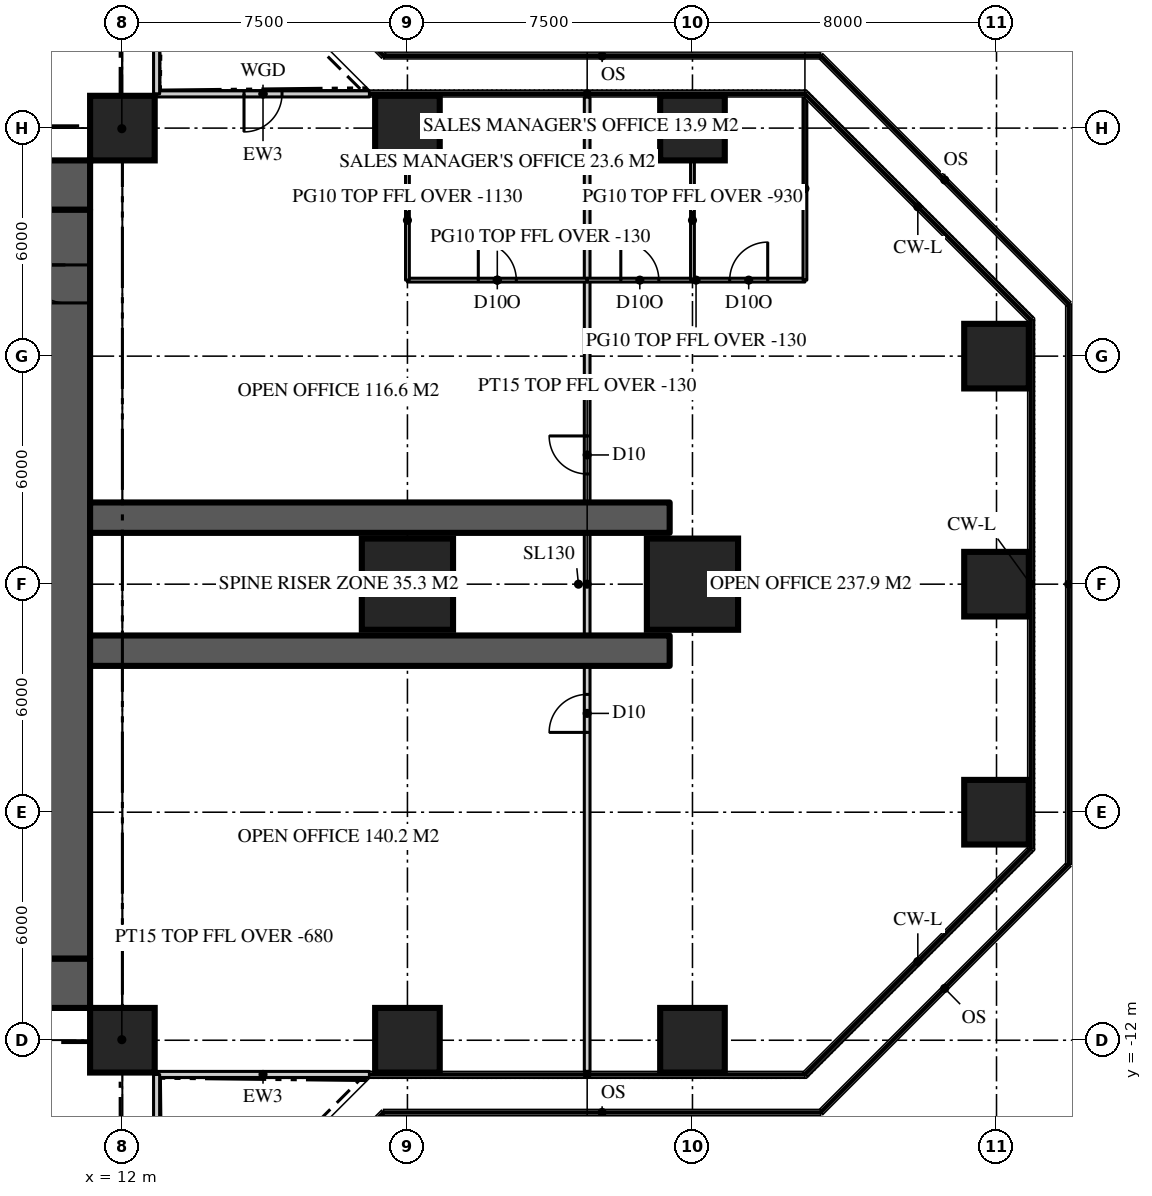
"""IFC4 building model, lengths in metres.
Left out: names, types, materials, properties, quantities, classifications, styles, units other than length and angle.
Written with IfcOpenShell. Run it as: python <this file> out.ifc"""

import sys

from ifc_helpers import new_model, si_unit, direction, frame, frame_2d, origin, origin_2d, place, context, subcontext, project, spatial, rectangle, extrude, element, fill, save


model = new_model("IFC4")
c1 = context("Model", 3, precision=1e-05, world=origin(), true_north=direction((0.0, 1.0)))
c2 = subcontext(c1, "Body", "Model", "MODEL_VIEW")
j1 = project(units=[si_unit("LENGTHUNIT", "METRE"), si_unit("PLANEANGLEUNIT", "RADIAN")], contexts=[c1])
p1 = place(None, origin())
s1 = spatial("IfcSite", under=j1, at=p1, CompositionType="ELEMENT")
p2 = place(p1, origin())
s2 = spatial("IfcBuilding", under=s1, at=p2, CompositionType="ELEMENT")
p3 = place(p2, frame((0.0, 0.0, 90.3)))
s3 = spatial("IfcBuildingStorey", under=s2, at=p3, CompositionType="ELEMENT", Elevation=90.3)
p4 = place(p3, frame((-11.15, 10.5, 0.0), z_axis=(0.0, 0.0, 1.0), x_axis=(1.0, 0.0, 0.0)))
e1 = element("IfcWall", 1, at=p4, inside=s3, PredefinedType="SHEAR", context=c2, shape_type="SweptSolid", body=[
    extrude(rectangle(XDim=22.3, YDim=1.3, at=frame_2d((11.15, 0.0))), origin(), (0.0, 0.0, 1.0), 3.9),
])
p5 = place(p4, frame((4.25, 0.0, 0.0)))
e2 = element("IfcOpeningElement", 2, at=p5, cuts=e1, PredefinedType="OPENING", context=c2, shape_type="SweptSolid", body=[
    extrude(rectangle(XDim=1.8, YDim=2.2, at=frame_2d((0.9, 1.1))), frame((0.0, 0.66, 0.0), z_axis=(0.0, -1.0, 0.0), x_axis=(1.0, 0.0, 0.0)), (0.0, 0.0, 1.0), 1.32),
])
p6 = place(p4, frame((16.25, 0.0, 0.0)))
e3 = element("IfcOpeningElement", 3, at=p6, cuts=e1, PredefinedType="OPENING", context=c2, shape_type="SweptSolid", body=[
    extrude(rectangle(XDim=1.8, YDim=2.2, at=frame_2d((0.9, 1.1))), frame((0.0, 0.66, 0.0), z_axis=(0.0, -1.0, 0.0), x_axis=(1.0, 0.0, 0.0)), (0.0, 0.0, 1.0), 1.32),
])
p7 = place(p3, frame((11.15, -10.5, 0.0), z_axis=(0.0, 0.0, 1.0), x_axis=(-1.0, 0.0, 0.0)))
e4 = element("IfcWall", 4, at=p7, inside=s3, PredefinedType="SHEAR", context=c2, shape_type="SweptSolid", body=[
    extrude(rectangle(XDim=22.3, YDim=1.3, at=frame_2d((11.15, 0.0))), origin(), (0.0, 0.0, 1.0), 3.9),
])
p8 = place(p7, frame((16.25, 0.0, 0.0)))
e5 = element("IfcOpeningElement", 5, at=p8, cuts=e4, PredefinedType="OPENING", context=c2, shape_type="SweptSolid", body=[
    extrude(rectangle(XDim=1.8, YDim=2.2, at=frame_2d((0.9, 1.1))), frame((0.0, 0.66, 0.0), z_axis=(0.0, -1.0, 0.0), x_axis=(1.0, 0.0, 0.0)), (0.0, 0.0, 1.0), 1.32),
])
p9 = place(p7, frame((4.25, 0.0, 0.0)))
e6 = element("IfcOpeningElement", 6, at=p9, cuts=e4, PredefinedType="OPENING", context=c2, shape_type="SweptSolid", body=[
    extrude(rectangle(XDim=1.8, YDim=2.2, at=frame_2d((0.9, 1.1))), frame((0.0, 0.66, 0.0), z_axis=(0.0, -1.0, 0.0), x_axis=(1.0, 0.0, 0.0)), (0.0, 0.0, 1.0), 1.32),
])
p10 = place(p3, frame((10.5, -9.85, 0.0), z_axis=(0.0, 0.0, 1.0), x_axis=(0.0, 1.0, 0.0)))
e7 = element("IfcWall", 7, at=p10, inside=s3, PredefinedType="SHEAR", context=c2, shape_type="SweptSolid", body=[
    extrude(rectangle(XDim=19.7, YDim=1.3, at=frame_2d((9.85, 0.0))), origin(), (0.0, 0.0, 1.0), 3.9),
])
p11 = place(p10, frame((17.25, 0.0, 0.0)))
e8 = element("IfcOpeningElement", 8, at=p11, cuts=e7, PredefinedType="OPENING", context=c2, shape_type="SweptSolid", body=[
    extrude(rectangle(XDim=1.0, YDim=2.2, at=frame_2d((0.5, 1.1))), frame((0.0, 0.66, 0.0), z_axis=(0.0, -1.0, 0.0), x_axis=(1.0, 0.0, 0.0)), (0.0, 0.0, 1.0), 1.32),
])
for number, where, z_axis, x_axis in (
    (9, (11.15, -1.75, 0.0), (0.0, 0.0, 1.0), (1.0, 0.0, 0.0)),
    (10, (11.15, 1.75, 0.0), (0.0, 0.0, 1.0), (1.0, 0.0, 0.0)),
):
    element("IfcWall", number, at=place(p3, frame(where, z_axis=z_axis, x_axis=x_axis)), inside=s3, PredefinedType="SHEAR", context=c2, shape_type="SweptSolid", body=[
        extrude(rectangle(XDim=15.25, YDim=0.8, at=frame_2d((7.625, 0.0))), origin(), (0.0, 0.0, 1.0), 3.9),
    ])
for number, where, z_axis, x_axis in (
    (11, (12.0, -12.0, 0.0), (0.0, 0.0, 1.0), (1.0, 0.0, 0.0)),
    (12, (19.5, -12.0, 0.0), (0.0, 0.0, 1.0), (1.0, 0.0, 0.0)),
    (13, (27.0, -12.0, 0.0), (0.0, 0.0, 1.0), (1.0, 0.0, 0.0)),
    (14, (35.0, -6.0, 0.0), (0.0, 0.0, 1.0), (1.0, 0.0, 0.0)),
):
    element("IfcColumn", number, at=place(p3, frame(where, z_axis=z_axis, x_axis=x_axis)), inside=s3, PredefinedType="COLUMN", context=c2, shape_type="SweptSolid", body=[
        extrude(rectangle(XDim=1.7, YDim=1.7, at=origin_2d()), origin(), (0.0, 0.0, 1.0), 3.9),
    ])
for number, where, z_axis, x_axis in (
    (15, (19.5, 0.0, 0.0), (0.0, 0.0, 1.0), (1.0, 0.0, 0.0)),
    (16, (27.0, 0.0, 0.0), (0.0, 0.0, 1.0), (1.0, 0.0, 0.0)),
):
    element("IfcColumn", number, at=place(p3, frame(where, z_axis=z_axis, x_axis=x_axis)), inside=s3, PredefinedType="COLUMN", context=c2, shape_type="SweptSolid", body=[
        extrude(rectangle(XDim=2.4, YDim=2.4, at=origin_2d()), origin(), (0.0, 0.0, 1.0), 3.9),
    ])
for number, where, z_axis, x_axis in (
    (17, (35.0, 0.0, 0.0), (0.0, 0.0, 1.0), (1.0, 0.0, 0.0)),
    (18, (35.0, 6.0, 0.0), (0.0, 0.0, 1.0), (1.0, 0.0, 0.0)),
    (19, (12.0, 12.0, 0.0), (0.0, 0.0, 1.0), (1.0, 0.0, 0.0)),
    (20, (19.5, 12.0, 0.0), (0.0, 0.0, 1.0), (1.0, 0.0, 0.0)),
    (21, (27.0, 12.0, 0.0), (0.0, 0.0, 1.0), (1.0, 0.0, 0.0)),
):
    element("IfcColumn", number, at=place(p3, frame(where, z_axis=z_axis, x_axis=x_axis)), inside=s3, PredefinedType="COLUMN", context=c2, shape_type="SweptSolid", body=[
        extrude(rectangle(XDim=1.7, YDim=1.7, at=origin_2d()), origin(), (0.0, 0.0, 1.0), 3.9),
    ])
p12 = place(p3, frame((12.9, -12.9, 0.0), z_axis=(0.0, 0.0, 1.0), x_axis=(1.0, 0.0, 0.0)))
e22 = element("IfcWall", 22, at=p12, inside=s3, PredefinedType="SOLIDWALL", context=c2, shape_type="SweptSolid", body=[
    extrude(rectangle(XDim=5.6, YDim=0.16, at=frame_2d((2.8, 0.0))), origin(), (0.0, 0.0, 1.0), 3.77),
])
p13 = place(p3, frame((18.5, 12.9, 0.0), z_axis=(0.0, 0.0, 1.0), x_axis=(-1.0, 0.0, 0.0)))
e23 = element("IfcWall", 23, at=p13, inside=s3, PredefinedType="SOLIDWALL", context=c2, shape_type="SweptSolid", body=[
    extrude(rectangle(XDim=5.6, YDim=0.16, at=frame_2d((2.8, 0.0))), origin(), (0.0, 0.0, 1.0), 3.77),
])
p14 = place(p13, frame((2.3, 0.0, 0.0)))
e24 = element("IfcOpeningElement", 24, at=p14, cuts=e23, PredefinedType="OPENING", context=c2, shape_type="SweptSolid", body=[
    extrude(rectangle(XDim=1.0, YDim=2.2, at=frame_2d((0.5, 1.1))), frame((0.0, 0.09, 0.0), z_axis=(0.0, -1.0, 0.0), x_axis=(1.0, 0.0, 0.0)), (0.0, 0.0, 1.0), 0.18),
])
p15 = place(p3, frame((12.9, 12.9, 0.0), z_axis=(0.0, 0.0, 1.0), x_axis=(0.0, 1.0, 0.0)))
e25 = element("IfcWall", 25, at=p15, inside=s3, PredefinedType="SOLIDWALL", context=c2, shape_type="SweptSolid", body=[
    extrude(rectangle(XDim=5.6, YDim=0.16, at=frame_2d((2.8, 0.0))), origin(), (0.0, 0.0, 1.0), 3.77),
])
p16 = place(p3, frame((12.9, -18.5, 0.0), z_axis=(0.0, 0.0, 1.0), x_axis=(0.0, 1.0, 0.0)))
e26 = element("IfcWall", 26, at=p16, inside=s3, PredefinedType="SOLIDWALL", context=c2, shape_type="SweptSolid", body=[
    extrude(rectangle(XDim=5.6, YDim=0.16, at=frame_2d((2.8, 0.0))), origin(), (0.0, 0.0, 1.0), 3.77),
])
p17 = place(p16, frame((2.3, 0.0, 0.0)))
e27 = element("IfcOpeningElement", 27, at=p17, cuts=e26, PredefinedType="OPENING", context=c2, shape_type="SweptSolid", body=[
    extrude(rectangle(XDim=1.0, YDim=2.2, at=frame_2d((0.5, 1.1))), frame((0.0, 0.09, 0.0), z_axis=(0.0, -1.0, 0.0), x_axis=(1.0, 0.0, 0.0)), (0.0, 0.0, 1.0), 0.18),
])
p18 = place(p3, frame((24.229, -12.82, 0.0), z_axis=(0.0, 0.0, 1.0), x_axis=(0.0, 1.0, 0.0)))
e28 = element("IfcWall", 28, at=p18, inside=s3, PredefinedType="PARTITIONING", context=c2, shape_type="SweptSolid", body=[
    extrude(rectangle(XDim=25.64, YDim=0.15, at=frame_2d((12.82, 0.0))), origin(), (0.0, 0.0, 1.0), 3.77),
])
p19 = place(p18, frame((15.72, 0.0, 0.0)))
e29 = element("IfcOpeningElement", 29, at=p19, cuts=e28, PredefinedType="OPENING", context=c2, shape_type="SweptSolid", body=[
    extrude(rectangle(XDim=1.0, YDim=2.2, at=frame_2d((0.5, 1.1))), frame((0.0, 0.085, 0.0), z_axis=(0.0, -1.0, 0.0), x_axis=(1.0, 0.0, 0.0)), (0.0, 0.0, 1.0), 0.17),
])
p20 = place(p18, frame((8.92, 0.0, 0.0)))
e30 = element("IfcOpeningElement", 30, at=p20, cuts=e28, PredefinedType="OPENING", context=c2, shape_type="SweptSolid", body=[
    extrude(rectangle(XDim=1.0, YDim=2.2, at=frame_2d((0.5, 1.1))), frame((0.0, 0.085, 0.0), z_axis=(0.0, -1.0, 0.0), x_axis=(1.0, 0.0, 0.0)), (0.0, 0.0, 1.0), 0.17),
])
p21 = place(p3, frame((19.5, 8.0, 0.0), z_axis=(0.0, 0.0, 1.0), x_axis=(1.0, 0.0, 0.0)))
e31 = element("IfcWall", 31, at=p21, inside=s3, PredefinedType="PARTITIONING", context=c2, shape_type="SweptSolid", body=[
    extrude(rectangle(XDim=4.729, YDim=0.1, at=frame_2d((2.365, 0.0))), origin(), (0.0, 0.0, 1.0), 3.77),
])
p22 = place(p21, frame((1.865, 0.0, 0.0)))
e32 = element("IfcOpeningElement", 32, at=p22, cuts=e31, PredefinedType="OPENING", context=c2, shape_type="SweptSolid", body=[
    extrude(rectangle(XDim=1.0, YDim=2.2, at=frame_2d((0.5, 1.1))), frame((0.0, 0.06, 0.0), z_axis=(0.0, -1.0, 0.0), x_axis=(1.0, 0.0, 0.0)), (0.0, 0.0, 1.0), 0.12),
])
p23 = place(p3, frame((24.229, 8.0, 0.0), z_axis=(0.0, 0.0, 1.0), x_axis=(1.0, 0.0, 0.0)))
e33 = element("IfcWall", 33, at=p23, inside=s3, PredefinedType="PARTITIONING", context=c2, shape_type="SweptSolid", body=[
    extrude(rectangle(XDim=5.73, YDim=0.1, at=frame_2d((2.865, 0.0))), origin(), (0.0, 0.0, 1.0), 3.77),
])
p24 = place(p23, frame((0.885, 0.0, 0.0)))
e34 = element("IfcOpeningElement", 34, at=p24, cuts=e33, PredefinedType="OPENING", context=c2, shape_type="SweptSolid", body=[
    extrude(rectangle(XDim=1.0, YDim=2.2, at=frame_2d((0.5, 1.1))), frame((0.0, 0.06, 0.0), z_axis=(0.0, -1.0, 0.0), x_axis=(1.0, 0.0, 0.0)), (0.0, 0.0, 1.0), 0.12),
])
p25 = place(p23, frame((3.75, 0.0, 0.0)))
e35 = element("IfcOpeningElement", 35, at=p25, cuts=e33, PredefinedType="OPENING", context=c2, shape_type="SweptSolid", body=[
    extrude(rectangle(XDim=1.0, YDim=2.2, at=frame_2d((0.5, 1.1))), frame((0.0, 0.06, 0.0), z_axis=(0.0, -1.0, 0.0), x_axis=(1.0, 0.0, 0.0)), (0.0, 0.0, 1.0), 0.12),
])
p26 = place(p3, frame((19.5, 8.0, 0.0), z_axis=(0.0, 0.0, 1.0), x_axis=(0.0, 1.0, 0.0)))
e36 = element("IfcWall", 36, at=p26, inside=s3, PredefinedType="PARTITIONING", context=c2, shape_type="SweptSolid", body=[
    extrude(rectangle(XDim=3.15, YDim=0.1, at=frame_2d((1.575, 0.0))), origin(), (0.0, 0.0, 1.0), 2.77),
])
p27 = place(p3, frame((27.0, 8.0, 0.0), z_axis=(0.0, 0.0, 1.0), x_axis=(0.0, 1.0, 0.0)))
e37 = element("IfcWall", 37, at=p27, inside=s3, PredefinedType="PARTITIONING", context=c2, shape_type="SweptSolid", body=[
    extrude(rectangle(XDim=3.15, YDim=0.1, at=frame_2d((1.575, 0.0))), origin(), (0.0, 0.0, 1.0), 2.97),
])
p28 = place(p3, frame((29.959, 8.0, 0.0), z_axis=(0.0, 0.0, 1.0), x_axis=(0.0, 1.0, 0.0)))
e38 = element("IfcWall", 38, at=p28, inside=s3, PredefinedType="PARTITIONING", context=c2, shape_type="SweptSolid", body=[
    extrude(rectangle(XDim=4.82, YDim=0.1, at=frame_2d((2.41, 0.0))), origin(), (0.0, 0.0, 1.0), 3.77),
])
for number, where, z_axis, x_axis in (
    (39, (11.15, 11.15, 0.0), (0.0, 0.0, 1.0), (0.707, 0.707, 0.0)),
    (40, (11.15, -11.15, 0.0), (0.0, 0.0, 1.0), (0.707, -0.707, 0.0)),
):
    element("IfcWall", number, at=place(p3, frame(where, z_axis=z_axis, x_axis=x_axis)), inside=s3, PredefinedType="PARTITIONING", context=c2, shape_type="SweptSolid", body=[
        extrude(rectangle(XDim=2.362, YDim=0.15, at=frame_2d((1.181, 0.0))), origin(), (0.0, 0.0, 1.0), 3.22),
    ])
p29 = place(p14, origin())
e41 = element("IfcDoor", 41, at=p29, inside=s3, OperationType="SINGLE_SWING_RIGHT", PredefinedType="DOOR", context=c2, shape_type="SweptSolid", body=[
    extrude(rectangle(XDim=1.0, YDim=2.2, at=frame_2d((0.5, 1.1))), frame((0.0, 0.025, 0.0), z_axis=(0.0, -1.0, 0.0), x_axis=(1.0, 0.0, 0.0)), (0.0, 0.0, 1.0), 0.05),
])
fill(e24, e41)
p30 = place(p11, origin())
e42 = element("IfcDoor", 42, at=p30, inside=s3, OperationType="SINGLE_SWING_RIGHT", PredefinedType="DOOR", context=c2, shape_type="SweptSolid", body=[
    extrude(rectangle(XDim=1.0, YDim=2.2, at=frame_2d((0.5, 1.1))), frame((0.0, 0.025, 0.0), z_axis=(0.0, -1.0, 0.0), x_axis=(1.0, 0.0, 0.0)), (0.0, 0.0, 1.0), 0.05),
])
fill(e8, e42)
p31 = place(p19, origin())
e43 = element("IfcDoor", 43, at=p31, inside=s3, OperationType="SINGLE_SWING_RIGHT", PredefinedType="DOOR", context=c2, shape_type="SweptSolid", body=[
    extrude(rectangle(XDim=1.0, YDim=2.2, at=frame_2d((0.5, 1.1))), frame((0.0, 0.025, 0.0), z_axis=(0.0, -1.0, 0.0), x_axis=(1.0, 0.0, 0.0)), (0.0, 0.0, 1.0), 0.05),
])
fill(e29, e43)
p32 = place(p20, origin())
e44 = element("IfcDoor", 44, at=p32, inside=s3, OperationType="SINGLE_SWING_LEFT", PredefinedType="DOOR", context=c2, shape_type="SweptSolid", body=[
    extrude(rectangle(XDim=1.0, YDim=2.2, at=frame_2d((0.5, 1.1))), frame((0.0, 0.025, 0.0), z_axis=(0.0, -1.0, 0.0), x_axis=(1.0, 0.0, 0.0)), (0.0, 0.0, 1.0), 0.05),
])
fill(e30, e44)
p33 = place(p22, origin())
e45 = element("IfcDoor", 45, at=p33, inside=s3, OperationType="SINGLE_SWING_LEFT", PredefinedType="DOOR", context=c2, shape_type="SweptSolid", body=[
    extrude(rectangle(XDim=1.0, YDim=2.2, at=frame_2d((0.5, 1.1))), frame((0.0, 0.025, 0.0), z_axis=(0.0, -1.0, 0.0), x_axis=(1.0, 0.0, 0.0)), (0.0, 0.0, 1.0), 0.05),
])
fill(e32, e45)
p34 = place(p24, origin())
e46 = element("IfcDoor", 46, at=p34, inside=s3, OperationType="SINGLE_SWING_LEFT", PredefinedType="DOOR", context=c2, shape_type="SweptSolid", body=[
    extrude(rectangle(XDim=1.0, YDim=2.2, at=frame_2d((0.5, 1.1))), frame((0.0, 0.025, 0.0), z_axis=(0.0, -1.0, 0.0), x_axis=(1.0, 0.0, 0.0)), (0.0, 0.0, 1.0), 0.05),
])
fill(e34, e46)
p35 = place(p25, origin())
e47 = element("IfcDoor", 47, at=p35, inside=s3, OperationType="SINGLE_SWING_RIGHT", PredefinedType="DOOR", context=c2, shape_type="SweptSolid", body=[
    extrude(rectangle(XDim=1.0, YDim=2.2, at=frame_2d((0.5, 1.1))), frame((0.0, 0.025, 0.0), z_axis=(0.0, -1.0, 0.0), x_axis=(1.0, 0.0, 0.0)), (0.0, 0.0, 1.0), 0.05),
])
fill(e35, e47)
save(model, sys.argv[1])
